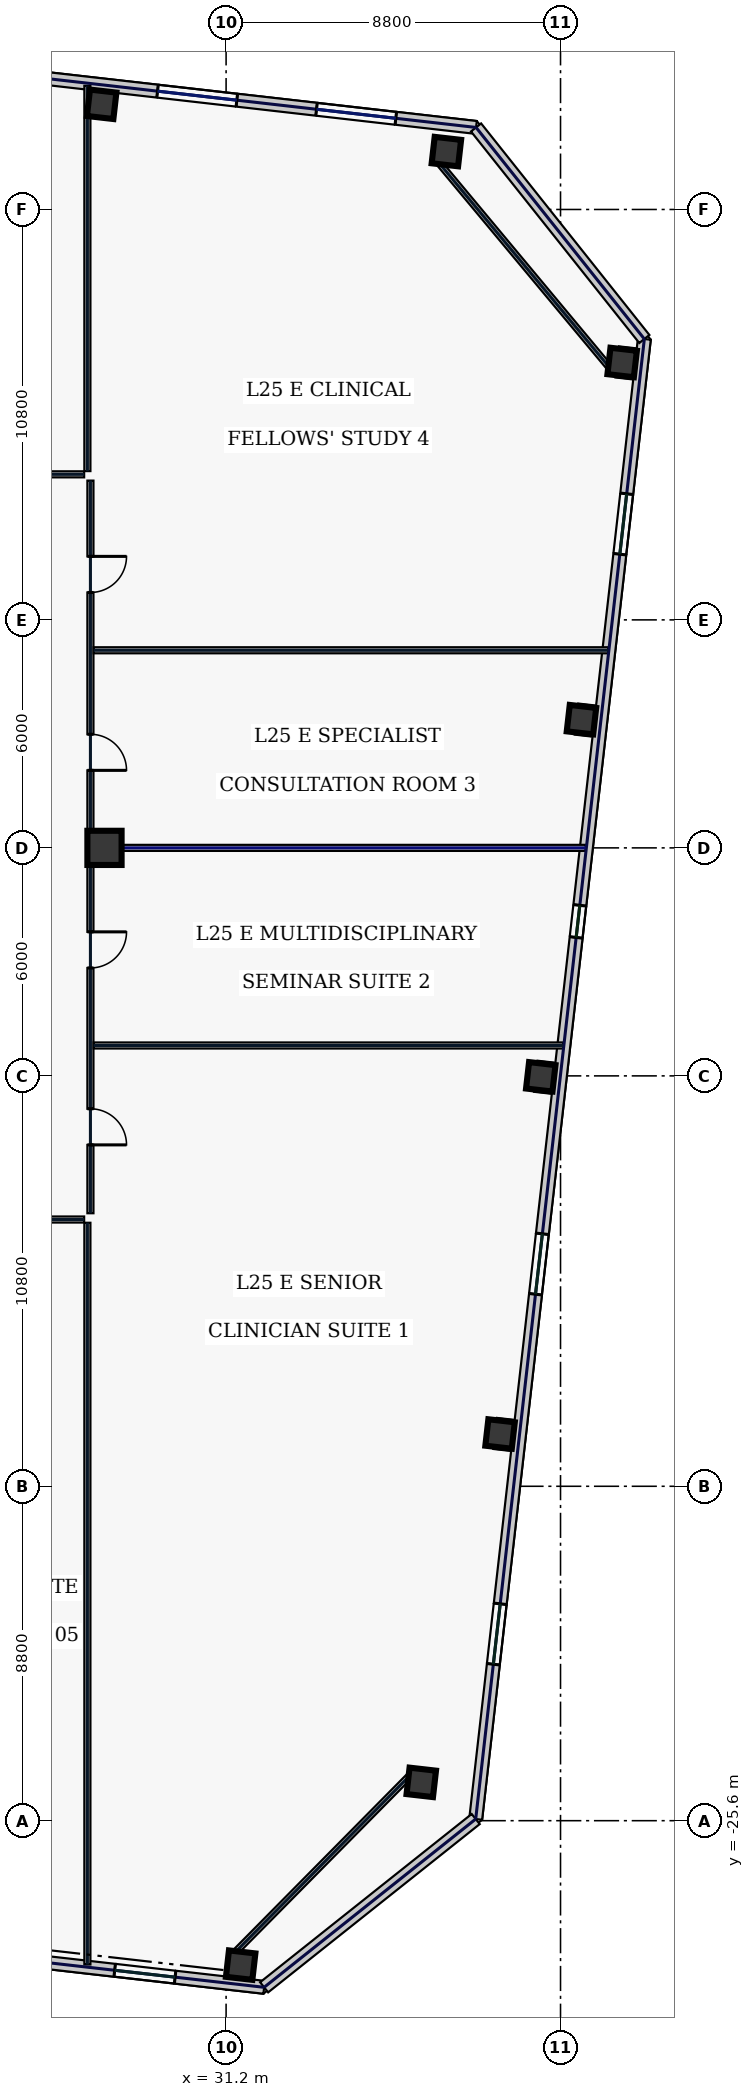
"""IFC4 building model, lengths in metres.
Left out: names, types, materials, properties, quantities, classifications, styles, units other than length and angle.
Written with IfcOpenShell. Run it as: python <this file> out.ifc"""

import sys

from ifc_helpers import new_model, si_unit, direction, frame, frame_2d, origin, origin_2d, place, context, subcontext, project, spatial, rectangle, hollow_rectangle, extrude, element, fill, save


model = new_model("IFC4")
c1 = context("Model", 3, precision=1e-05, world=origin(), true_north=direction((0.0, 1.0)))
c2 = subcontext(c1, "Body", "Model", "MODEL_VIEW")
j1 = project(units=[si_unit("LENGTHUNIT", "METRE"), si_unit("PLANEANGLEUNIT", "RADIAN")], contexts=[c1])
p1 = place(None, origin())
s1 = spatial("IfcSite", under=j1, at=p1, CompositionType="ELEMENT")
p2 = place(p1, origin())
s2 = spatial("IfcBuilding", under=s1, at=p2, CompositionType="ELEMENT")
p3 = place(p2, frame((0.0, 0.0, 113.4)))
s3 = spatial("IfcBuildingStorey", under=s2, at=p3, CompositionType="ELEMENT", Elevation=113.4)
p4 = place(p3, frame((28.0, 0.0, 0.0), z_axis=(0.0, 0.0, 1.0), x_axis=(1.0, 0.0, 0.0)))
e1 = element("IfcColumn", 1, at=p4, inside=s3, PredefinedType="COLUMN", context=c2, shape_type="SweptSolid", body=[
    extrude(hollow_rectangle(XDim=0.9, YDim=0.9, WallThickness=0.04, at=origin_2d()), origin(), (0.0, 0.0, 1.0), 3.74),
])
for number, where, z_axis, x_axis in (
    (2, (31.583, -29.401, 0.0), (0.0, 0.0, 1.0), (0.994, -0.113, 0.0)),
    (3, (36.997, 18.323, 0.0), (0.0, 0.0, 1.0), (0.994, -0.113, 0.0)),
    (4, (27.926, 19.568, 0.0), (0.0, 0.0, 1.0), (0.994, -0.113, 0.0)),
    (5, (36.336, -24.592, 0.0), (0.0, 0.0, 1.0), (0.994, -0.113, 0.0)),
    (6, (38.409, -15.424, 0.0), (0.0, 0.0, 1.0), (0.994, -0.113, 0.0)),
    (7, (39.48, -6.025, 0.0), (0.0, 0.0, 1.0), (0.994, -0.113, 0.0)),
    (8, (40.551, 3.375, 0.0), (0.0, 0.0, 1.0), (0.994, -0.113, 0.0)),
    (9, (41.622, 12.774, 0.0), (0.0, 0.0, 1.0), (0.994, -0.113, 0.0)),
):
    element("IfcColumn", number, at=place(p3, frame(where, z_axis=z_axis, x_axis=x_axis)), inside=s3, PredefinedType="COLUMN", context=c2, shape_type="SweptSolid", body=[
        extrude(hollow_rectangle(XDim=0.7, YDim=0.7, WallThickness=0.032, at=origin_2d()), origin(), (0.0, 0.0, 1.0), 3.74),
    ])
p5 = place(p3, frame((11.115, -27.582, 0.0), z_axis=(0.0, 0.0, 1.0), x_axis=(0.993572655904, -0.113196190044, 0.0)))
e10 = element("IfcWall", 10, at=p5, inside=s3, PredefinedType="STANDARD", context=c2, shape_type="SweptSolid", body=[
    extrude(rectangle(XDim=21.223, YDim=0.34, at=frame_2d((10.611, 0.0))), origin(), (0.0, 0.0, 1.0), 3.74),
])
p6 = place(p5, frame((3.616, 0.0, 0.67)))
e11 = element("IfcOpeningElement", 11, at=p6, cuts=e10, PredefinedType="OPENING", context=c2, shape_type="SweptSolid", body=[
    extrude(rectangle(XDim=0.85, YDim=1.85, at=frame_2d((0.425, 0.925))), frame((0.0, 0.18, 0.0), z_axis=(0.0, -1.0, 0.0), x_axis=(1.0, 0.0, 0.0)), (0.0, 0.0, 1.0), 0.36),
])
p7 = place(p5, frame((7.838, 0.0, 0.67)))
e12 = element("IfcOpeningElement", 12, at=p7, cuts=e10, PredefinedType="OPENING", context=c2, shape_type="SweptSolid", body=[
    extrude(rectangle(XDim=2.1, YDim=2.2, at=frame_2d((1.05, 1.1))), frame((0.0, 0.18, 0.0), z_axis=(0.0, -1.0, 0.0), x_axis=(1.0, 0.0, 0.0)), (0.0, 0.0, 1.0), 0.36),
])
p8 = place(p5, frame((12.794, 0.0, 0.67)))
e13 = element("IfcOpeningElement", 13, at=p8, cuts=e10, PredefinedType="OPENING", context=c2, shape_type="SweptSolid", body=[
    extrude(rectangle(XDim=2.1, YDim=2.2, at=frame_2d((1.05, 1.1))), frame((0.0, 0.18, 0.0), z_axis=(0.0, -1.0, 0.0), x_axis=(1.0, 0.0, 0.0)), (0.0, 0.0, 1.0), 0.36),
])
p9 = place(p5, frame((17.265, 0.0, 0.22)))
e14 = element("IfcOpeningElement", 14, at=p9, cuts=e10, PredefinedType="OPENING", context=c2, shape_type="SweptSolid", body=[
    extrude(rectangle(XDim=1.6, YDim=1.2, at=frame_2d((0.8, 0.6))), frame((0.0, 0.18, 0.0), z_axis=(0.0, -1.0, 0.0), x_axis=(1.0, 0.0, 0.0)), (0.0, 0.0, 1.0), 0.36),
])
p10 = place(p3, frame((37.777, 18.958, 0.0), z_axis=(0.0, 0.0, 1.0), x_axis=(-0.993570699365, 0.113213362125, 0.0)))
e15 = element("IfcWall", 15, at=p10, inside=s3, PredefinedType="STANDARD", context=c2, shape_type="SweptSolid", body=[
    extrude(rectangle(XDim=17.75, YDim=0.34, at=frame_2d((8.875, 0.0))), origin(), (0.0, 0.0, 1.0), 3.74),
])
p11 = place(p10, frame((11.285, 0.0, 0.67)))
e16 = element("IfcOpeningElement", 16, at=p11, cuts=e15, PredefinedType="OPENING", context=c2, shape_type="SweptSolid", body=[
    extrude(rectangle(XDim=2.1, YDim=2.2, at=frame_2d((1.05, 1.1))), frame((0.0, 0.18, 0.0), z_axis=(0.0, -1.0, 0.0), x_axis=(1.0, 0.0, 0.0)), (0.0, 0.0, 1.0), 0.36),
])
p12 = place(p10, frame((6.336, 0.0, 0.67)))
e17 = element("IfcOpeningElement", 17, at=p12, cuts=e15, PredefinedType="OPENING", context=c2, shape_type="SweptSolid", body=[
    extrude(rectangle(XDim=2.1, YDim=2.2, at=frame_2d((1.05, 1.1))), frame((0.0, 0.18, 0.0), z_axis=(0.0, -1.0, 0.0), x_axis=(1.0, 0.0, 0.0)), (0.0, 0.0, 1.0), 0.36),
])
p13 = place(p10, frame((2.125, 0.0, 0.67)))
e18 = element("IfcOpeningElement", 18, at=p13, cuts=e15, PredefinedType="OPENING", context=c2, shape_type="SweptSolid", body=[
    extrude(rectangle(XDim=2.1, YDim=2.2, at=frame_2d((1.05, 1.1))), frame((0.0, 0.18, 0.0), z_axis=(0.0, -1.0, 0.0), x_axis=(1.0, 0.0, 0.0)), (0.0, 0.0, 1.0), 0.36),
])
p14 = place(p3, frame((37.768, -25.556, 0.0), z_axis=(0.0, 0.0, 1.0), x_axis=(0.113201605824, 0.993572038877, 0.0)))
e19 = element("IfcWall", 19, at=p14, inside=s3, PredefinedType="STANDARD", context=c2, shape_type="SweptSolid", body=[
    extrude(rectangle(XDim=39.2, YDim=0.34, at=frame_2d((19.6, 0.0))), origin(), (0.0, 0.0, 1.0), 3.74),
])
p15 = place(p14, frame((4.1, 0.0, 0.58)))
e20 = element("IfcOpeningElement", 20, at=p15, cuts=e19, PredefinedType="OPENING", context=c2, shape_type="SweptSolid", body=[
    extrude(rectangle(XDim=1.6, YDim=2.3, at=frame_2d((0.8, 1.15))), frame((0.0, 0.18, 0.0), z_axis=(0.0, -1.0, 0.0), x_axis=(1.0, 0.0, 0.0)), (0.0, 0.0, 1.0), 0.36),
])
p16 = place(p14, frame((13.9, 0.0, 0.58)))
e21 = element("IfcOpeningElement", 21, at=p16, cuts=e19, PredefinedType="OPENING", context=c2, shape_type="SweptSolid", body=[
    extrude(rectangle(XDim=1.6, YDim=2.3, at=frame_2d((0.8, 1.15))), frame((0.0, 0.18, 0.0), z_axis=(0.0, -1.0, 0.0), x_axis=(1.0, 0.0, 0.0)), (0.0, 0.0, 1.0), 0.36),
])
p17 = place(p14, frame((23.35, 0.0, 0.75)))
e22 = element("IfcOpeningElement", 22, at=p17, cuts=e19, PredefinedType="OPENING", context=c2, shape_type="SweptSolid", body=[
    extrude(rectangle(XDim=0.85, YDim=1.85, at=frame_2d((0.425, 0.925))), frame((0.0, 0.18, 0.0), z_axis=(0.0, -1.0, 0.0), x_axis=(1.0, 0.0, 0.0)), (0.0, 0.0, 1.0), 0.36),
])
p18 = place(p14, frame((33.5, 0.0, 0.58)))
e23 = element("IfcOpeningElement", 23, at=p18, cuts=e19, PredefinedType="OPENING", context=c2, shape_type="SweptSolid", body=[
    extrude(rectangle(XDim=1.6, YDim=2.3, at=frame_2d((0.8, 1.15))), frame((0.0, 0.18, 0.0), z_axis=(0.0, -1.0, 0.0), x_axis=(1.0, 0.0, 0.0)), (0.0, 0.0, 1.0), 0.36),
])
p19 = place(p3, frame((32.201, -29.985, 0.0), z_axis=(0.0, 0.0, 1.0), x_axis=(0.78261359446, 0.622507800567, 0.0)))
e24 = element("IfcWall", 24, at=p19, inside=s3, PredefinedType="STANDARD", context=c2, shape_type="SweptSolid", body=[
    extrude(rectangle(XDim=7.114, YDim=0.34, at=frame_2d((3.557, 0.0))), origin(), (0.0, 0.0, 1.0), 3.74),
])
p20 = place(p3, frame((42.206, 13.392, 0.0), z_axis=(0.0, 0.0, 1.0), x_axis=(-0.622524521309, 0.782600294128, 0.0)))
e25 = element("IfcWall", 25, at=p20, inside=s3, PredefinedType="STANDARD", context=c2, shape_type="SweptSolid", body=[
    extrude(rectangle(XDim=7.113, YDim=0.34, at=frame_2d((3.557, 0.0))), origin(), (0.0, 0.0, 1.0), 3.74),
])
p21 = place(p3, frame((31.341, -29.162, 0.0), z_axis=(0.0, 0.0, 1.0), x_axis=(0.702905898933, 0.711282853192, 0.0)))
e26 = element("IfcWall", 26, at=p21, inside=s3, PredefinedType="PARTITIONING", context=c2, shape_type="SweptSolid", body=[
    extrude(rectangle(XDim=6.761, YDim=0.16, at=frame_2d((3.381, 0.0))), origin(), (0.0, 0.0, 1.0), 3.74),
])
p22 = place(p3, frame((41.361, 12.556, 0.0), z_axis=(0.0, 0.0, 1.0), x_axis=(-0.640217638562, 0.768193579298, 0.0)))
e27 = element("IfcWall", 27, at=p22, inside=s3, PredefinedType="PARTITIONING", context=c2, shape_type="SweptSolid", body=[
    extrude(rectangle(XDim=7.224, YDim=0.16, at=frame_2d((3.612, 0.0))), origin(), (0.0, 0.0, 1.0), 3.74),
])
p23 = place(p3, frame((-27.465, 9.83, 0.0), z_axis=(0.0, 0.0, 1.0), x_axis=(1.0, 0.0, 0.0)))
e28 = element("IfcWall", 28, at=p23, inside=s3, PredefinedType="PARTITIONING", context=c2, shape_type="SweptSolid", body=[
    extrude(rectangle(XDim=54.93, YDim=0.16, at=frame_2d((27.465, 0.0))), origin(), (0.0, 0.0, 1.0), 3.74),
])
p24 = place(p23, frame((2.044, 0.0, 0.0)))
e29 = element("IfcOpeningElement", 29, at=p24, cuts=e28, PredefinedType="OPENING", context=c2, shape_type="SweptSolid", body=[
    extrude(rectangle(XDim=0.95, YDim=2.2, at=frame_2d((0.475, 1.1))), frame((0.0, 0.09, 0.0), z_axis=(0.0, -1.0, 0.0), x_axis=(1.0, 0.0, 0.0)), (0.0, 0.0, 1.0), 0.18),
])
p25 = place(p23, frame((7.275, 0.0, 0.0)))
e30 = element("IfcOpeningElement", 30, at=p25, cuts=e28, PredefinedType="OPENING", context=c2, shape_type="SweptSolid", body=[
    extrude(rectangle(XDim=0.95, YDim=2.2, at=frame_2d((0.475, 1.1))), frame((0.0, 0.09, 0.0), z_axis=(0.0, -1.0, 0.0), x_axis=(1.0, 0.0, 0.0)), (0.0, 0.0, 1.0), 0.18),
])
p26 = place(p23, frame((13.025, 0.0, 0.0)))
e31 = element("IfcOpeningElement", 31, at=p26, cuts=e28, PredefinedType="OPENING", context=c2, shape_type="SweptSolid", body=[
    extrude(rectangle(XDim=1.05, YDim=2.2, at=frame_2d((0.525, 1.1))), frame((0.0, 0.09, 0.0), z_axis=(0.0, -1.0, 0.0), x_axis=(1.0, 0.0, 0.0)), (0.0, 0.0, 1.0), 0.18),
])
p27 = place(p23, frame((19.075, 0.0, 0.0)))
e32 = element("IfcOpeningElement", 32, at=p27, cuts=e28, PredefinedType="OPENING", context=c2, shape_type="SweptSolid", body=[
    extrude(rectangle(XDim=1.3, YDim=2.2, at=frame_2d((0.65, 1.1))), frame((0.0, 0.09, 0.0), z_axis=(0.0, -1.0, 0.0), x_axis=(1.0, 0.0, 0.0)), (0.0, 0.0, 1.0), 0.18),
])
p28 = place(p23, frame((25.775, 0.0, 0.0)))
e33 = element("IfcOpeningElement", 33, at=p28, cuts=e28, PredefinedType="OPENING", context=c2, shape_type="SweptSolid", body=[
    extrude(rectangle(XDim=1.45, YDim=2.2, at=frame_2d((0.725, 1.1))), frame((0.0, 0.09, 0.0), z_axis=(0.0, -1.0, 0.0), x_axis=(1.0, 0.0, 0.0)), (0.0, 0.0, 1.0), 0.18),
])
p29 = place(p23, frame((33.444, 0.0, 0.0)))
e34 = element("IfcOpeningElement", 34, at=p29, cuts=e28, PredefinedType="OPENING", context=c2, shape_type="SweptSolid", body=[
    extrude(rectangle(XDim=1.3, YDim=2.2, at=frame_2d((0.65, 1.1))), frame((0.0, 0.09, 0.0), z_axis=(0.0, -1.0, 0.0), x_axis=(1.0, 0.0, 0.0)), (0.0, 0.0, 1.0), 0.18),
])
p30 = place(p23, frame((41.341, 0.0, 0.0)))
e35 = element("IfcOpeningElement", 35, at=p30, cuts=e28, PredefinedType="OPENING", context=c2, shape_type="SweptSolid", body=[
    extrude(rectangle(XDim=0.95, YDim=2.2, at=frame_2d((0.475, 1.1))), frame((0.0, 0.09, 0.0), z_axis=(0.0, -1.0, 0.0), x_axis=(1.0, 0.0, 0.0)), (0.0, 0.0, 1.0), 0.18),
])
p31 = place(p23, frame((47.247, 0.0, 0.0)))
e36 = element("IfcOpeningElement", 36, at=p31, cuts=e28, PredefinedType="OPENING", context=c2, shape_type="SweptSolid", body=[
    extrude(rectangle(XDim=1.05, YDim=2.2, at=frame_2d((0.525, 1.1))), frame((0.0, 0.09, 0.0), z_axis=(0.0, -1.0, 0.0), x_axis=(1.0, 0.0, 0.0)), (0.0, 0.0, 1.0), 0.18),
])
p32 = place(p23, frame((51.931, 0.0, 0.0)))
e37 = element("IfcOpeningElement", 37, at=p32, cuts=e28, PredefinedType="OPENING", context=c2, shape_type="SweptSolid", body=[
    extrude(rectangle(XDim=1.3, YDim=2.2, at=frame_2d((0.65, 1.1))), frame((0.0, 0.09, 0.0), z_axis=(0.0, -1.0, 0.0), x_axis=(1.0, 0.0, 0.0)), (0.0, 0.0, 1.0), 0.18),
])
p33 = place(p3, frame((27.63, 9.665, 0.0), z_axis=(0.0, 0.0, 1.0), x_axis=(0.0, -1.0, 0.0)))
e38 = element("IfcWall", 38, at=p33, inside=s3, PredefinedType="PARTITIONING", context=c2, shape_type="SweptSolid", body=[
    extrude(rectangle(XDim=19.28, YDim=0.16, at=frame_2d((9.64, 0.0))), origin(), (0.0, 0.0, 1.0), 3.74),
])
p34 = place(p33, frame((16.531, 0.0, 0.0)))
e39 = element("IfcOpeningElement", 39, at=p34, cuts=e38, PredefinedType="OPENING", context=c2, shape_type="SweptSolid", body=[
    extrude(rectangle(XDim=0.95, YDim=2.2, at=frame_2d((0.475, 1.1))), frame((0.0, 0.09, 0.0), z_axis=(0.0, -1.0, 0.0), x_axis=(1.0, 0.0, 0.0)), (0.0, 0.0, 1.0), 0.18),
])
p35 = place(p33, frame((11.875, 0.0, 0.0)))
e40 = element("IfcOpeningElement", 40, at=p35, cuts=e38, PredefinedType="OPENING", context=c2, shape_type="SweptSolid", body=[
    extrude(rectangle(XDim=0.95, YDim=2.2, at=frame_2d((0.475, 1.1))), frame((0.0, 0.09, 0.0), z_axis=(0.0, -1.0, 0.0), x_axis=(1.0, 0.0, 0.0)), (0.0, 0.0, 1.0), 0.18),
])
p36 = place(p33, frame((6.675, 0.0, 0.0)))
e41 = element("IfcOpeningElement", 41, at=p36, cuts=e38, PredefinedType="OPENING", context=c2, shape_type="SweptSolid", body=[
    extrude(rectangle(XDim=0.95, YDim=2.2, at=frame_2d((0.475, 1.1))), frame((0.0, 0.09, 0.0), z_axis=(0.0, -1.0, 0.0), x_axis=(1.0, 0.0, 0.0)), (0.0, 0.0, 1.0), 0.18),
])
p37 = place(p33, frame((1.994, 0.0, 0.0)))
e42 = element("IfcOpeningElement", 42, at=p37, cuts=e38, PredefinedType="OPENING", context=c2, shape_type="SweptSolid", body=[
    extrude(rectangle(XDim=0.95, YDim=2.2, at=frame_2d((0.475, 1.1))), frame((0.0, 0.09, 0.0), z_axis=(0.0, -1.0, 0.0), x_axis=(1.0, 0.0, 0.0)), (0.0, 0.0, 1.0), 0.18),
])
p38 = place(p3, frame((27.465, -9.78, 0.0), z_axis=(0.0, 0.0, 1.0), x_axis=(-1.0, 0.0, 0.0)))
e43 = element("IfcWall", 43, at=p38, inside=s3, PredefinedType="PARTITIONING", context=c2, shape_type="SweptSolid", body=[
    extrude(rectangle(XDim=6.7, YDim=0.16, at=frame_2d((3.35, 0.0))), origin(), (0.0, 0.0, 1.0), 3.74),
])
p39 = place(p38, frame((2.369, 0.0, 0.0)))
e44 = element("IfcOpeningElement", 44, at=p39, cuts=e43, PredefinedType="OPENING", context=c2, shape_type="SweptSolid", body=[
    extrude(rectangle(XDim=1.45, YDim=2.2, at=frame_2d((0.725, 1.1))), frame((0.0, 0.09, 0.0), z_axis=(0.0, -1.0, 0.0), x_axis=(1.0, 0.0, 0.0)), (0.0, 0.0, 1.0), 0.18),
])
p40 = place(p3, frame((27.55, 9.915, 0.0), z_axis=(0.0, 0.0, 1.0), x_axis=(0.0, 1.0, 0.0)))
e45 = element("IfcWall", 45, at=p40, inside=s3, PredefinedType="PARTITIONING", context=c2, shape_type="SweptSolid", body=[
    extrude(rectangle(XDim=10.138, YDim=0.16, at=frame_2d((5.069, 0.0))), origin(), (0.0, 0.0, 1.0), 3.74),
])
p41 = place(p3, frame((27.55, -29.385, 0.0), z_axis=(0.0, 0.0, 1.0), x_axis=(0.0, 1.0, 0.0)))
e46 = element("IfcWall", 46, at=p41, inside=s3, PredefinedType="PARTITIONING", context=c2, shape_type="SweptSolid", body=[
    extrude(rectangle(XDim=19.52, YDim=0.16, at=frame_2d((9.76, 0.0))), origin(), (0.0, 0.0, 1.0), 3.74),
])
p42 = place(p3, frame((27.715, -5.2, 0.0), z_axis=(0.0, 0.0, 1.0), x_axis=(1.0, 0.0, 0.0)))
e47 = element("IfcWall", 47, at=p42, inside=s3, PredefinedType="PARTITIONING", context=c2, shape_type="SweptSolid", body=[
    extrude(rectangle(XDim=12.352, YDim=0.16, at=frame_2d((6.176, 0.0))), origin(), (0.0, 0.0, 1.0), 3.74),
])
p43 = place(p3, frame((27.715, 0.0, 0.0), z_axis=(0.0, 0.0, 1.0), x_axis=(1.0, 0.0, 0.0)))
e48 = element("IfcWall", 48, at=p43, inside=s3, PredefinedType="PARTITIONING", context=c2, shape_type="SweptSolid", body=[
    extrude(rectangle(XDim=12.945, YDim=0.16, at=frame_2d((6.472, 0.0))), origin(), (0.0, 0.0, 1.0), 3.235),
])
p44 = place(p3, frame((27.715, 5.2, 0.0), z_axis=(0.0, 0.0, 1.0), x_axis=(1.0, 0.0, 0.0)))
e49 = element("IfcWall", 49, at=p44, inside=s3, PredefinedType="PARTITIONING", context=c2, shape_type="SweptSolid", body=[
    extrude(rectangle(XDim=13.537, YDim=0.16, at=frame_2d((6.769, 0.0))), origin(), (0.0, 0.0, 1.0), 3.74),
])
p45 = place(p9, origin())
e50 = element("IfcWindow", 50, at=p45, inside=s3, PartitioningType="SINGLE_PANEL", PredefinedType="WINDOW", context=c2, shape_type="SweptSolid", body=[
    extrude(rectangle(XDim=1.6, YDim=1.2, at=frame_2d((0.8, 0.6))), frame((0.0, 0.03, 0.0), z_axis=(0.0, -1.0, 0.0), x_axis=(1.0, 0.0, 0.0)), (0.0, 0.0, 1.0), 0.06),
])
fill(e14, e50)
p46 = place(p12, origin())
e51 = element("IfcWindow", 51, at=p46, inside=s3, PartitioningType="SINGLE_PANEL", PredefinedType="WINDOW", context=c2, shape_type="SweptSolid", body=[
    extrude(rectangle(XDim=2.1, YDim=2.2, at=frame_2d((1.05, 1.1))), frame((0.0, 0.03, 0.0), z_axis=(0.0, -1.0, 0.0), x_axis=(1.0, 0.0, 0.0)), (0.0, 0.0, 1.0), 0.06),
])
fill(e17, e51)
p47 = place(p13, origin())
e52 = element("IfcWindow", 52, at=p47, inside=s3, PartitioningType="SINGLE_PANEL", PredefinedType="WINDOW", context=c2, shape_type="SweptSolid", body=[
    extrude(rectangle(XDim=2.1, YDim=2.2, at=frame_2d((1.05, 1.1))), frame((0.0, 0.03, 0.0), z_axis=(0.0, -1.0, 0.0), x_axis=(1.0, 0.0, 0.0)), (0.0, 0.0, 1.0), 0.06),
])
fill(e18, e52)
p48 = place(p15, origin())
e53 = element("IfcWindow", 53, at=p48, inside=s3, PartitioningType="SINGLE_PANEL", PredefinedType="WINDOW", context=c2, shape_type="SweptSolid", body=[
    extrude(rectangle(XDim=1.6, YDim=2.3, at=frame_2d((0.8, 1.15))), frame((0.0, 0.03, 0.0), z_axis=(0.0, -1.0, 0.0), x_axis=(1.0, 0.0, 0.0)), (0.0, 0.0, 1.0), 0.06),
])
fill(e20, e53)
p49 = place(p16, origin())
e54 = element("IfcWindow", 54, at=p49, inside=s3, PartitioningType="SINGLE_PANEL", PredefinedType="WINDOW", context=c2, shape_type="SweptSolid", body=[
    extrude(rectangle(XDim=1.6, YDim=2.3, at=frame_2d((0.8, 1.15))), frame((0.0, 0.03, 0.0), z_axis=(0.0, -1.0, 0.0), x_axis=(1.0, 0.0, 0.0)), (0.0, 0.0, 1.0), 0.06),
])
fill(e21, e54)
p50 = place(p17, origin())
e55 = element("IfcWindow", 55, at=p50, inside=s3, PartitioningType="SINGLE_PANEL", PredefinedType="WINDOW", context=c2, shape_type="SweptSolid", body=[
    extrude(rectangle(XDim=0.85, YDim=1.85, at=frame_2d((0.425, 0.925))), frame((0.0, 0.03, 0.0), z_axis=(0.0, -1.0, 0.0), x_axis=(1.0, 0.0, 0.0)), (0.0, 0.0, 1.0), 0.06),
])
fill(e22, e55)
p51 = place(p18, origin())
e56 = element("IfcWindow", 56, at=p51, inside=s3, PartitioningType="SINGLE_PANEL", PredefinedType="WINDOW", context=c2, shape_type="SweptSolid", body=[
    extrude(rectangle(XDim=1.6, YDim=2.3, at=frame_2d((0.8, 1.15))), frame((0.0, 0.03, 0.0), z_axis=(0.0, -1.0, 0.0), x_axis=(1.0, 0.0, 0.0)), (0.0, 0.0, 1.0), 0.06),
])
fill(e23, e56)
p52 = place(p34, origin())
e57 = element("IfcDoor", 57, at=p52, inside=s3, OperationType="SINGLE_SWING_RIGHT", PredefinedType="DOOR", context=c2, shape_type="SweptSolid", body=[
    extrude(rectangle(XDim=0.95, YDim=2.2, at=frame_2d((0.475, 1.1))), frame((0.0, 0.025, 0.0), z_axis=(0.0, -1.0, 0.0), x_axis=(1.0, 0.0, 0.0)), (0.0, 0.0, 1.0), 0.05),
])
fill(e39, e57)
p53 = place(p35, origin())
e58 = element("IfcDoor", 58, at=p53, inside=s3, OperationType="SINGLE_SWING_LEFT", PredefinedType="DOOR", context=c2, shape_type="SweptSolid", body=[
    extrude(rectangle(XDim=0.95, YDim=2.2, at=frame_2d((0.475, 1.1))), frame((0.0, 0.025, 0.0), z_axis=(0.0, -1.0, 0.0), x_axis=(1.0, 0.0, 0.0)), (0.0, 0.0, 1.0), 0.05),
])
fill(e40, e58)
p54 = place(p36, origin())
e59 = element("IfcDoor", 59, at=p54, inside=s3, OperationType="SINGLE_SWING_RIGHT", PredefinedType="DOOR", context=c2, shape_type="SweptSolid", body=[
    extrude(rectangle(XDim=0.95, YDim=2.2, at=frame_2d((0.475, 1.1))), frame((0.0, 0.025, 0.0), z_axis=(0.0, -1.0, 0.0), x_axis=(1.0, 0.0, 0.0)), (0.0, 0.0, 1.0), 0.05),
])
fill(e41, e59)
p55 = place(p37, origin())
e60 = element("IfcDoor", 60, at=p55, inside=s3, OperationType="SINGLE_SWING_LEFT", PredefinedType="DOOR", context=c2, shape_type="SweptSolid", body=[
    extrude(rectangle(XDim=0.95, YDim=2.2, at=frame_2d((0.475, 1.1))), frame((0.0, 0.025, 0.0), z_axis=(0.0, -1.0, 0.0), x_axis=(1.0, 0.0, 0.0)), (0.0, 0.0, 1.0), 0.05),
])
fill(e42, e60)
save(model, sys.argv[1])
